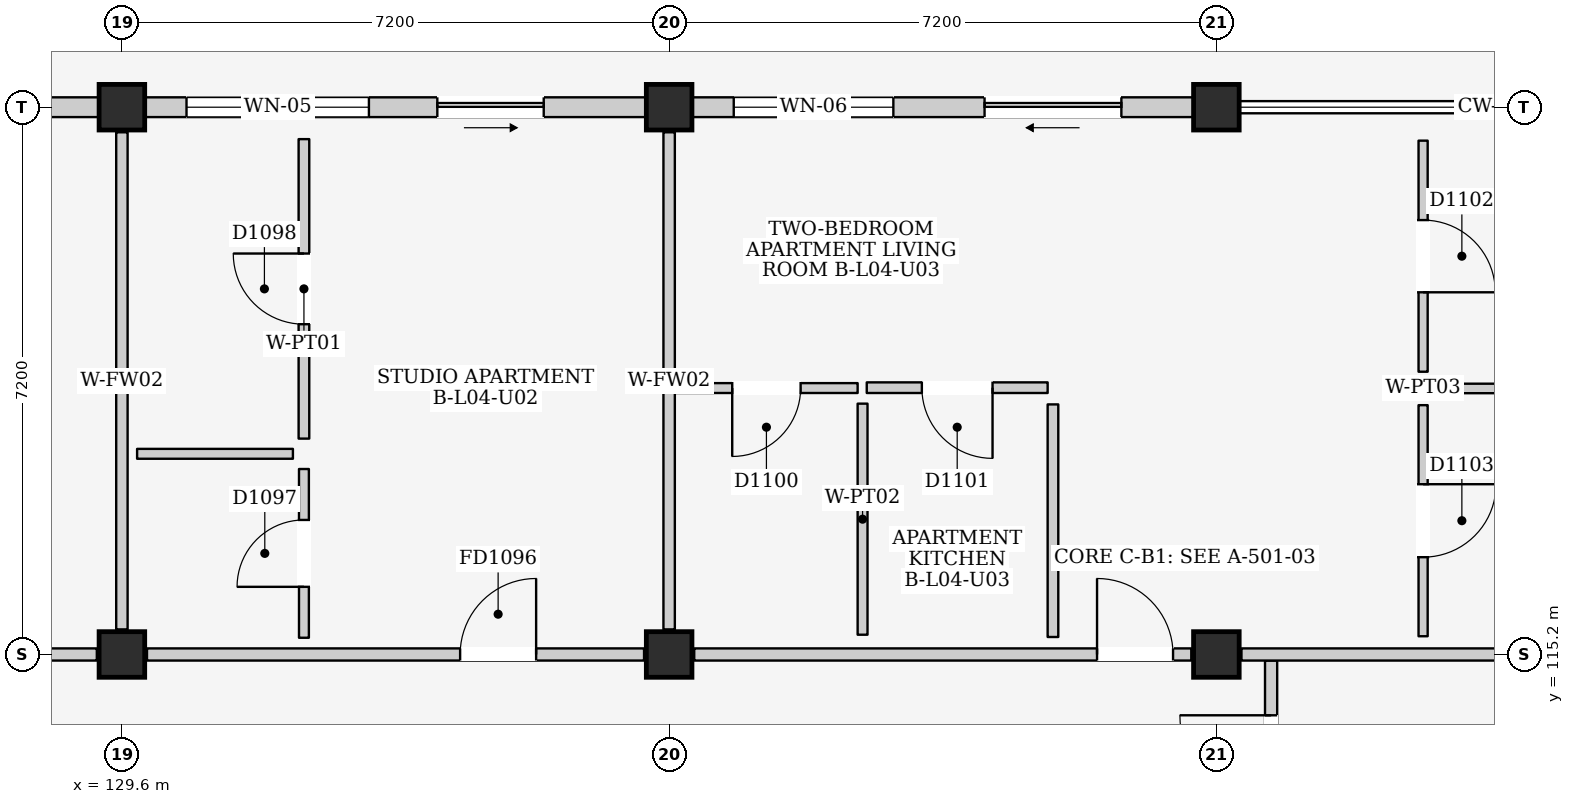
"""IFC4 building model, lengths in metres.
Left out: names, types, materials, properties, quantities, classifications, styles, units other than length and angle.
Written with IfcOpenShell. Run it as: python <this file> out.ifc"""

import sys

from ifc_helpers import new_model, si_unit, direction, frame, frame_2d, origin, origin_2d, place, context, subcontext, project, spatial, rectangle, extrude, element, fill, save


model = new_model("IFC4")
c1 = context("Model", 3, precision=1e-05, world=origin(), true_north=direction((0.0, 1.0)))
c2 = subcontext(c1, "Body", "Model", "MODEL_VIEW")
j1 = project(units=[si_unit("LENGTHUNIT", "METRE"), si_unit("PLANEANGLEUNIT", "RADIAN")], contexts=[c1])
p1 = place(None, origin())
s1 = spatial("IfcSite", under=j1, at=p1, CompositionType="ELEMENT")
p2 = place(p1, origin())
s2 = spatial("IfcBuilding", under=s1, at=p2, CompositionType="ELEMENT")
p3 = place(p2, frame((0.0, 0.0, 15.4)))
s3 = spatial("IfcBuildingStorey", under=s2, at=p3, CompositionType="ELEMENT", Elevation=15.4)
for number, where, z_axis, x_axis in (
    (1, (129.6, 115.2, 0.0), (0.0, 0.0, 1.0), (1.0, 0.0, 0.0)),
    (2, (129.6, 122.4, 0.0), (0.0, 0.0, 1.0), (1.0, 0.0, 0.0)),
    (3, (136.8, 115.2, 0.0), (0.0, 0.0, 1.0), (1.0, 0.0, 0.0)),
    (4, (136.8, 122.4, 0.0), (0.0, 0.0, 1.0), (1.0, 0.0, 0.0)),
    (5, (144.0, 115.2, 0.0), (0.0, 0.0, 1.0), (1.0, 0.0, 0.0)),
    (6, (144.0, 122.4, 0.0), (0.0, 0.0, 1.0), (1.0, 0.0, 0.0)),
):
    element("IfcColumn", number, at=place(p3, frame(where, z_axis=z_axis, x_axis=x_axis)), inside=s3, PredefinedType="COLUMN", context=c2, shape_type="SweptSolid", body=[
        extrude(rectangle(XDim=0.6, YDim=0.6, at=origin_2d()), origin(), (0.0, 0.0, 1.0), 3.2),
    ])
p4 = place(p3, frame((122.7, 122.4, 0.0), z_axis=(0.0, 0.0, 1.0), x_axis=(1.0, 0.0, 0.0)))
e7 = element("IfcWall", 7, at=p4, inside=s3, PredefinedType="ELEMENTEDWALL", context=c2, shape_type="SweptSolid", body=[
    extrude(rectangle(XDim=6.6, YDim=0.26, at=frame_2d((3.3, 0.0))), origin(), (0.0, 0.0, 1.0), 2.43),
])
p5 = place(p4, frame((3.85, 0.0, 0.0)))
e8 = element("IfcOpeningElement", 8, at=p5, cuts=e7, PredefinedType="OPENING", context=c2, shape_type="SweptSolid", body=[
    extrude(rectangle(XDim=2.0, YDim=2.12, at=frame_2d((1.0, 1.06))), frame((0.0, 0.145, 0.0), z_axis=(0.0, -1.0, 0.0), x_axis=(1.0, 0.0, 0.0)), (0.0, 0.0, 1.0), 0.29),
])
p6 = place(p4, frame((0.55, 0.0, 0.9)))
e9 = element("IfcOpeningElement", 9, at=p6, cuts=e7, PredefinedType="OPENING", context=c2, shape_type="SweptSolid", body=[
    extrude(rectangle(XDim=0.9, YDim=1.1, at=frame_2d((0.45, 0.55))), frame((0.0, 0.145, 0.0), z_axis=(0.0, -1.0, 0.0), x_axis=(1.0, 0.0, 0.0)), (0.0, 0.0, 1.0), 0.29),
])
p7 = place(p3, frame((129.9, 122.4, 0.0), z_axis=(0.0, 0.0, 1.0), x_axis=(1.0, 0.0, 0.0)))
e10 = element("IfcWall", 10, at=p7, inside=s3, PredefinedType="ELEMENTEDWALL", context=c2, shape_type="SweptSolid", body=[
    extrude(rectangle(XDim=6.6, YDim=0.26, at=frame_2d((3.3, 0.0))), origin(), (0.0, 0.0, 1.0), 2.43),
])
p8 = place(p7, frame((3.85, 0.0, 0.0)))
e11 = element("IfcOpeningElement", 11, at=p8, cuts=e10, PredefinedType="OPENING", context=c2, shape_type="SweptSolid", body=[
    extrude(rectangle(XDim=1.4, YDim=2.1, at=frame_2d((0.7, 1.05))), frame((0.0, 0.145, 0.0), z_axis=(0.0, -1.0, 0.0), x_axis=(1.0, 0.0, 0.0)), (0.0, 0.0, 1.0), 0.29),
])
p9 = place(p7, frame((0.55, 0.0, 0.66)))
e12 = element("IfcOpeningElement", 12, at=p9, cuts=e10, PredefinedType="OPENING", context=c2, shape_type="SweptSolid", body=[
    extrude(rectangle(XDim=2.4, YDim=1.65, at=frame_2d((1.2, 0.825))), frame((0.0, 0.145, 0.0), z_axis=(0.0, -1.0, 0.0), x_axis=(1.0, 0.0, 0.0)), (0.0, 0.0, 1.0), 0.29),
])
p10 = place(p3, frame((137.1, 122.4, 0.0), z_axis=(0.0, 0.0, 1.0), x_axis=(1.0, 0.0, 0.0)))
e13 = element("IfcWall", 13, at=p10, inside=s3, PredefinedType="ELEMENTEDWALL", context=c2, shape_type="SweptSolid", body=[
    extrude(rectangle(XDim=6.6, YDim=0.26, at=frame_2d((3.3, 0.0))), origin(), (0.0, 0.0, 1.0), 2.43),
])
p11 = place(p10, frame((3.85, 0.0, 0.0)))
e14 = element("IfcOpeningElement", 14, at=p11, cuts=e13, PredefinedType="OPENING", context=c2, shape_type="SweptSolid", body=[
    extrude(rectangle(XDim=1.8, YDim=2.12, at=frame_2d((0.9, 1.06))), frame((0.0, 0.145, 0.0), z_axis=(0.0, -1.0, 0.0), x_axis=(1.0, 0.0, 0.0)), (0.0, 0.0, 1.0), 0.29),
])
p12 = place(p10, frame((0.55, 0.0, 0.66)))
e15 = element("IfcOpeningElement", 15, at=p12, cuts=e13, PredefinedType="OPENING", context=c2, shape_type="SweptSolid", body=[
    extrude(rectangle(XDim=2.1, YDim=1.65, at=frame_2d((1.05, 0.825))), frame((0.0, 0.145, 0.0), z_axis=(0.0, -1.0, 0.0), x_axis=(1.0, 0.0, 0.0)), (0.0, 0.0, 1.0), 0.29),
])
p13 = place(p3, frame((144.72, 111.1, 0.0), z_axis=(0.0, 0.0, 1.0), x_axis=(0.0, 1.0, 0.0)))
e16 = element("IfcWall", 16, at=p13, inside=s3, PredefinedType="PARTITIONING", context=c2, shape_type="SweptSolid", body=[
    extrude(rectangle(XDim=4.02, YDim=0.16, at=frame_2d((2.01, 0.0))), origin(), (0.0, 0.0, 1.0), 2.95),
])
p14 = place(p13, frame((2.1, 0.0, 0.0)))
e17 = element("IfcOpeningElement", 17, at=p14, cuts=e16, PredefinedType="OPENING", context=c2, shape_type="SweptSolid", body=[
    extrude(rectangle(XDim=1.2, YDim=2.2, at=frame_2d((0.6, 1.1))), frame((0.0, 0.095, 0.0), z_axis=(0.0, -1.0, 0.0), x_axis=(1.0, 0.0, 0.0)), (0.0, 0.0, 1.0), 0.19),
])
p15 = place(p3, frame((122.73, 115.2, 0.0), z_axis=(0.0, 0.0, 1.0), x_axis=(1.0, 0.0, 0.0)))
e18 = element("IfcWall", 18, at=p15, inside=s3, PredefinedType="PARTITIONING", context=c2, shape_type="SweptSolid", body=[
    extrude(rectangle(XDim=6.54, YDim=0.16, at=frame_2d((3.27, 0.0))), origin(), (0.0, 0.0, 1.0), 2.335),
])
p16 = place(p15, frame((4.095, 0.0, 0.0)))
e19 = element("IfcOpeningElement", 19, at=p16, cuts=e18, PredefinedType="OPENING", context=c2, shape_type="SweptSolid", body=[
    extrude(rectangle(XDim=1.05, YDim=2.2, at=frame_2d((0.525, 1.1))), frame((0.0, 0.095, 0.0), z_axis=(0.0, -1.0, 0.0), x_axis=(1.0, 0.0, 0.0)), (0.0, 0.0, 1.0), 0.19),
])
p17 = place(p3, frame((129.6, 115.53, 0.0), z_axis=(0.0, 0.0, 1.0), x_axis=(0.0, 1.0, 0.0)))
e20 = element("IfcWall", 20, at=p17, inside=s3, PredefinedType="PARTITIONING", context=c2, shape_type="SweptSolid", body=[
    extrude(rectangle(XDim=6.54, YDim=0.15, at=frame_2d((3.27, 0.0))), origin(), (0.0, 0.0, 1.0), 2.385),
])
p18 = place(p3, frame((129.93, 115.2, 0.0), z_axis=(0.0, 0.0, 1.0), x_axis=(1.0, 0.0, 0.0)))
e21 = element("IfcWall", 21, at=p18, inside=s3, PredefinedType="PARTITIONING", context=c2, shape_type="SweptSolid", body=[
    extrude(rectangle(XDim=6.54, YDim=0.16, at=frame_2d((3.27, 0.0))), origin(), (0.0, 0.0, 1.0), 2.335),
])
p19 = place(p18, frame((4.12, 0.0, 0.0)))
e22 = element("IfcOpeningElement", 22, at=p19, cuts=e21, PredefinedType="OPENING", context=c2, shape_type="SweptSolid", body=[
    extrude(rectangle(XDim=1.0, YDim=2.15, at=frame_2d((0.5, 1.075))), frame((0.0, 0.095, 0.0), z_axis=(0.0, -1.0, 0.0), x_axis=(1.0, 0.0, 0.0)), (0.0, 0.0, 1.0), 0.19),
])
p20 = place(p3, frame((136.8, 115.53, 0.0), z_axis=(0.0, 0.0, 1.0), x_axis=(0.0, 1.0, 0.0)))
e23 = element("IfcWall", 23, at=p20, inside=s3, PredefinedType="PARTITIONING", context=c2, shape_type="SweptSolid", body=[
    extrude(rectangle(XDim=6.54, YDim=0.15, at=frame_2d((3.27, 0.0))), origin(), (0.0, 0.0, 1.0), 2.385),
])
p21 = place(p3, frame((129.8, 117.84, 0.0), z_axis=(0.0, 0.0, 1.0), x_axis=(1.0, 0.0, 0.0)))
e24 = element("IfcWall", 24, at=p21, inside=s3, PredefinedType="PARTITIONING", context=c2, shape_type="SweptSolid", body=[
    extrude(rectangle(XDim=2.05, YDim=0.13, at=frame_2d((1.025, 0.0))), origin(), (0.0, 0.0, 1.0), 2.95),
])
p22 = place(p3, frame((131.995, 115.42, 0.0), z_axis=(0.0, 0.0, 1.0), x_axis=(0.0, 1.0, 0.0)))
e25 = element("IfcWall", 25, at=p22, inside=s3, PredefinedType="PARTITIONING", context=c2, shape_type="SweptSolid", body=[
    extrude(rectangle(XDim=2.22, YDim=0.13, at=frame_2d((1.11, 0.0))), origin(), (0.0, 0.0, 1.0), 2.95),
])
p23 = place(p22, frame((0.67, 0.0, 0.0)))
e26 = element("IfcOpeningElement", 26, at=p23, cuts=e25, PredefinedType="OPENING", context=c2, shape_type="SweptSolid", body=[
    extrude(rectangle(XDim=0.88, YDim=2.1, at=frame_2d((0.44, 1.05))), frame((0.0, 0.08, 0.0), z_axis=(0.0, -1.0, 0.0), x_axis=(1.0, 0.0, 0.0)), (0.0, 0.0, 1.0), 0.16),
])
p24 = place(p3, frame((131.995, 118.04, 0.0), z_axis=(0.0, 0.0, 1.0), x_axis=(0.0, 1.0, 0.0)))
e27 = element("IfcWall", 27, at=p24, inside=s3, PredefinedType="PARTITIONING", context=c2, shape_type="SweptSolid", body=[
    extrude(rectangle(XDim=3.94, YDim=0.14, at=frame_2d((1.97, 0.0))), origin(), (0.0, 0.0, 1.0), 2.95),
])
p25 = place(p24, frame((1.505, 0.0, 0.0)))
e28 = element("IfcOpeningElement", 28, at=p25, cuts=e27, PredefinedType="OPENING", context=c2, shape_type="SweptSolid", body=[
    extrude(rectangle(XDim=0.93, YDim=2.14, at=frame_2d((0.465, 1.07))), frame((0.0, 0.085, 0.0), z_axis=(0.0, -1.0, 0.0), x_axis=(1.0, 0.0, 0.0)), (0.0, 0.0, 1.0), 0.17),
])
p26 = place(p3, frame((137.13, 115.2, 0.0), z_axis=(0.0, 0.0, 1.0), x_axis=(1.0, 0.0, 0.0)))
e29 = element("IfcWall", 29, at=p26, inside=s3, PredefinedType="PARTITIONING", context=c2, shape_type="SweptSolid", body=[
    extrude(rectangle(XDim=6.54, YDim=0.16, at=frame_2d((3.27, 0.0))), origin(), (0.0, 0.0, 1.0), 2.335),
])
p27 = place(p26, frame((5.3, 0.0, 0.0)))
e30 = element("IfcOpeningElement", 30, at=p27, cuts=e29, PredefinedType="OPENING", context=c2, shape_type="SweptSolid", body=[
    extrude(rectangle(XDim=1.0, YDim=2.15, at=frame_2d((0.5, 1.075))), frame((0.0, 0.095, 0.0), z_axis=(0.0, -1.0, 0.0), x_axis=(1.0, 0.0, 0.0)), (0.0, 0.0, 1.0), 0.19),
])
p28 = place(p3, frame((144.33, 115.2, 0.0), z_axis=(0.0, 0.0, 1.0), x_axis=(1.0, 0.0, 0.0)))
e31 = element("IfcWall", 31, at=p28, inside=s3, PredefinedType="PARTITIONING", context=c2, shape_type="SweptSolid", body=[
    extrude(rectangle(XDim=6.54, YDim=0.16, at=frame_2d((3.27, 0.0))), origin(), (0.0, 0.0, 1.0), 2.335),
])
p29 = place(p3, frame((136.88, 118.705, 0.0), z_axis=(0.0, 0.0, 1.0), x_axis=(1.0, 0.0, 0.0)))
e32 = element("IfcWall", 32, at=p29, inside=s3, PredefinedType="PARTITIONING", context=c2, shape_type="SweptSolid", body=[
    extrude(rectangle(XDim=2.4, YDim=0.13, at=frame_2d((1.2, 0.0))), origin(), (0.0, 0.0, 1.0), 2.95),
])
p30 = place(p29, frame((0.75, 0.0, 0.0)))
e33 = element("IfcOpeningElement", 33, at=p30, cuts=e32, PredefinedType="OPENING", context=c2, shape_type="SweptSolid", body=[
    extrude(rectangle(XDim=0.9, YDim=2.1, at=frame_2d((0.45, 1.05))), frame((0.0, 0.08, 0.0), z_axis=(0.0, -1.0, 0.0), x_axis=(1.0, 0.0, 0.0)), (0.0, 0.0, 1.0), 0.16),
])
p31 = place(p3, frame((139.345, 115.46, 0.0), z_axis=(0.0, 0.0, 1.0), x_axis=(0.0, 1.0, 0.0)))
e34 = element("IfcWall", 34, at=p31, inside=s3, PredefinedType="PARTITIONING", context=c2, shape_type="SweptSolid", body=[
    extrude(rectangle(XDim=3.04, YDim=0.13, at=frame_2d((1.52, 0.0))), origin(), (0.0, 0.0, 1.0), 2.95),
])
p32 = place(p3, frame((139.4, 118.71, 0.0), z_axis=(0.0, 0.0, 1.0), x_axis=(1.0, 0.0, 0.0)))
e35 = element("IfcWall", 35, at=p32, inside=s3, PredefinedType="PARTITIONING", context=c2, shape_type="SweptSolid", body=[
    extrude(rectangle(XDim=2.38, YDim=0.14, at=frame_2d((1.19, 0.0))), origin(), (0.0, 0.0, 1.0), 2.95),
])
p33 = place(p32, frame((0.725, 0.0, 0.0)))
e36 = element("IfcOpeningElement", 36, at=p33, cuts=e35, PredefinedType="OPENING", context=c2, shape_type="SweptSolid", body=[
    extrude(rectangle(XDim=0.93, YDim=2.14, at=frame_2d((0.465, 1.07))), frame((0.0, 0.085, 0.0), z_axis=(0.0, -1.0, 0.0), x_axis=(1.0, 0.0, 0.0)), (0.0, 0.0, 1.0), 0.17),
])
p34 = place(p3, frame((141.85, 115.43, 0.0), z_axis=(0.0, 0.0, 1.0), x_axis=(0.0, 1.0, 0.0)))
e37 = element("IfcWall", 37, at=p34, inside=s3, PredefinedType="PARTITIONING", context=c2, shape_type="SweptSolid", body=[
    extrude(rectangle(XDim=3.06, YDim=0.14, at=frame_2d((1.53, 0.0))), origin(), (0.0, 0.0, 1.0), 2.95),
])
p35 = place(p3, frame((146.72, 118.92, 0.0), z_axis=(0.0, 0.0, 1.0), x_axis=(0.0, 1.0, 0.0)))
e38 = element("IfcWall", 38, at=p35, inside=s3, PredefinedType="PARTITIONING", context=c2, shape_type="SweptSolid", body=[
    extrude(rectangle(XDim=3.04, YDim=0.12, at=frame_2d((1.52, 0.0))), origin(), (0.0, 0.0, 1.0), 2.95),
])
p36 = place(p35, frame((1.045, 0.0, 0.0)))
e39 = element("IfcOpeningElement", 39, at=p36, cuts=e38, PredefinedType="OPENING", context=c2, shape_type="SweptSolid", body=[
    extrude(rectangle(XDim=0.95, YDim=2.15, at=frame_2d((0.475, 1.075))), frame((0.0, 0.075, 0.0), z_axis=(0.0, -1.0, 0.0), x_axis=(1.0, 0.0, 0.0)), (0.0, 0.0, 1.0), 0.15),
])
p37 = place(p3, frame((146.92, 118.7, 0.0), z_axis=(0.0, 0.0, 1.0), x_axis=(1.0, 0.0, 0.0)))
e40 = element("IfcWall", 40, at=p37, inside=s3, PredefinedType="PARTITIONING", context=c2, shape_type="SweptSolid", body=[
    extrude(rectangle(XDim=4.06, YDim=0.125, at=frame_2d((2.03, 0.0))), origin(), (0.0, 0.0, 1.0), 2.95),
])
p38 = place(p3, frame((146.72, 115.44, 0.0), z_axis=(0.0, 0.0, 1.0), x_axis=(0.0, 1.0, 0.0)))
e41 = element("IfcWall", 41, at=p38, inside=s3, PredefinedType="PARTITIONING", context=c2, shape_type="SweptSolid", body=[
    extrude(rectangle(XDim=3.04, YDim=0.12, at=frame_2d((1.52, 0.0))), origin(), (0.0, 0.0, 1.0), 2.95),
])
p39 = place(p38, frame((1.04, 0.0, 0.0)))
e42 = element("IfcOpeningElement", 42, at=p39, cuts=e41, PredefinedType="OPENING", context=c2, shape_type="SweptSolid", body=[
    extrude(rectangle(XDim=0.96, YDim=2.15, at=frame_2d((0.48, 1.075))), frame((0.0, 0.075, 0.0), z_axis=(0.0, -1.0, 0.0), x_axis=(1.0, 0.0, 0.0)), (0.0, 0.0, 1.0), 0.15),
])
p40 = place(p8, frame((1.4, 0.0, 0.0), z_axis=(0.0, 0.0, 1.0), x_axis=(-1.0, 0.0, 0.0)))
e43 = element("IfcDoor", 43, at=p40, inside=s3, OperationType="SLIDING_TO_RIGHT", PredefinedType="DOOR", context=c2, shape_type="SweptSolid", body=[
    extrude(rectangle(XDim=1.4, YDim=2.1, at=frame_2d((0.7, 1.05))), frame((0.0, 0.025, 0.0), z_axis=(0.0, -1.0, 0.0), x_axis=(1.0, 0.0, 0.0)), (0.0, 0.0, 1.0), 0.05),
])
fill(e11, e43)
p41 = place(p9, origin())
e44 = element("IfcWindow", 44, at=p41, inside=s3, PartitioningType="TRIPLE_PANEL_VERTICAL", PredefinedType="WINDOW", context=c2, shape_type="SweptSolid", body=[
    extrude(rectangle(XDim=2.4, YDim=1.65, at=frame_2d((1.2, 0.825))), frame((0.0, 0.03, 0.0), z_axis=(0.0, -1.0, 0.0), x_axis=(1.0, 0.0, 0.0)), (0.0, 0.0, 1.0), 0.06),
])
fill(e12, e44)
p42 = place(p11, frame((1.8, 0.0, 0.0), z_axis=(0.0, 0.0, 1.0), x_axis=(-1.0, 0.0, 0.0)))
e45 = element("IfcDoor", 45, at=p42, inside=s3, OperationType="SLIDING_TO_LEFT", PredefinedType="DOOR", context=c2, shape_type="SweptSolid", body=[
    extrude(rectangle(XDim=1.8, YDim=2.12, at=frame_2d((0.9, 1.06))), frame((0.0, 0.025, 0.0), z_axis=(0.0, -1.0, 0.0), x_axis=(1.0, 0.0, 0.0)), (0.0, 0.0, 1.0), 0.05),
])
fill(e14, e45)
p43 = place(p12, origin())
e46 = element("IfcWindow", 46, at=p43, inside=s3, PartitioningType="DOUBLE_PANEL_VERTICAL", PredefinedType="WINDOW", context=c2, shape_type="SweptSolid", body=[
    extrude(rectangle(XDim=2.1, YDim=1.65, at=frame_2d((1.05, 0.825))), frame((0.0, 0.03, 0.0), z_axis=(0.0, -1.0, 0.0), x_axis=(1.0, 0.0, 0.0)), (0.0, 0.0, 1.0), 0.06),
])
fill(e15, e46)
p44 = place(p14, origin())
e47 = element("IfcDoor", 47, at=p44, inside=s3, OperationType="SINGLE_SWING_RIGHT", PredefinedType="DOOR", context=c2, shape_type="SweptSolid", body=[
    extrude(rectangle(XDim=1.2, YDim=2.2, at=frame_2d((0.6, 1.1))), frame((0.0, 0.025, 0.0), z_axis=(0.0, -1.0, 0.0), x_axis=(1.0, 0.0, 0.0)), (0.0, 0.0, 1.0), 0.05),
])
fill(e17, e47)
p45 = place(p19, origin())
e48 = element("IfcDoor", 48, at=p45, inside=s3, OperationType="SINGLE_SWING_RIGHT", PredefinedType="DOOR", context=c2, shape_type="SweptSolid", body=[
    extrude(rectangle(XDim=1.0, YDim=2.15, at=frame_2d((0.5, 1.075))), frame((0.0, 0.025, 0.0), z_axis=(0.0, -1.0, 0.0), x_axis=(1.0, 0.0, 0.0)), (0.0, 0.0, 1.0), 0.05),
])
fill(e22, e48)
p46 = place(p23, origin())
e49 = element("IfcDoor", 49, at=p46, inside=s3, OperationType="SINGLE_SWING_LEFT", PredefinedType="DOOR", context=c2, shape_type="SweptSolid", body=[
    extrude(rectangle(XDim=0.88, YDim=2.1, at=frame_2d((0.44, 1.05))), frame((0.0, 0.025, 0.0), z_axis=(0.0, -1.0, 0.0), x_axis=(1.0, 0.0, 0.0)), (0.0, 0.0, 1.0), 0.05),
])
fill(e26, e49)
p47 = place(p25, origin())
e50 = element("IfcDoor", 50, at=p47, inside=s3, OperationType="SINGLE_SWING_RIGHT", PredefinedType="DOOR", context=c2, shape_type="SweptSolid", body=[
    extrude(rectangle(XDim=0.93, YDim=2.14, at=frame_2d((0.465, 1.07))), frame((0.0, 0.025, 0.0), z_axis=(0.0, -1.0, 0.0), x_axis=(1.0, 0.0, 0.0)), (0.0, 0.0, 1.0), 0.05),
])
fill(e28, e50)
p48 = place(p27, origin())
e51 = element("IfcDoor", 51, at=p48, inside=s3, OperationType="SINGLE_SWING_LEFT", PredefinedType="DOOR", context=c2, shape_type="SweptSolid", body=[
    extrude(rectangle(XDim=1.0, YDim=2.15, at=frame_2d((0.5, 1.075))), frame((0.0, 0.025, 0.0), z_axis=(0.0, -1.0, 0.0), x_axis=(1.0, 0.0, 0.0)), (0.0, 0.0, 1.0), 0.05),
])
fill(e30, e51)
p49 = place(p30, frame((0.9, 0.0, 0.0), z_axis=(0.0, 0.0, 1.0), x_axis=(-1.0, 0.0, 0.0)))
e52 = element("IfcDoor", 52, at=p49, inside=s3, OperationType="SINGLE_SWING_RIGHT", PredefinedType="DOOR", context=c2, shape_type="SweptSolid", body=[
    extrude(rectangle(XDim=0.9, YDim=2.1, at=frame_2d((0.45, 1.05))), frame((0.0, 0.025, 0.0), z_axis=(0.0, -1.0, 0.0), x_axis=(1.0, 0.0, 0.0)), (0.0, 0.0, 1.0), 0.05),
])
fill(e33, e52)
p50 = place(p33, frame((0.93, 0.0, 0.0), z_axis=(0.0, 0.0, 1.0), x_axis=(-1.0, 0.0, 0.0)))
e53 = element("IfcDoor", 53, at=p50, inside=s3, OperationType="SINGLE_SWING_LEFT", PredefinedType="DOOR", context=c2, shape_type="SweptSolid", body=[
    extrude(rectangle(XDim=0.93, YDim=2.14, at=frame_2d((0.465, 1.07))), frame((0.0, 0.025, 0.0), z_axis=(0.0, -1.0, 0.0), x_axis=(1.0, 0.0, 0.0)), (0.0, 0.0, 1.0), 0.05),
])
fill(e36, e53)
p51 = place(p36, frame((0.95, 0.0, 0.0), z_axis=(0.0, 0.0, 1.0), x_axis=(-1.0, 0.0, 0.0)))
e54 = element("IfcDoor", 54, at=p51, inside=s3, OperationType="SINGLE_SWING_RIGHT", PredefinedType="DOOR", context=c2, shape_type="SweptSolid", body=[
    extrude(rectangle(XDim=0.95, YDim=2.15, at=frame_2d((0.475, 1.075))), frame((0.0, 0.025, 0.0), z_axis=(0.0, -1.0, 0.0), x_axis=(1.0, 0.0, 0.0)), (0.0, 0.0, 1.0), 0.05),
])
fill(e39, e54)
p52 = place(p39, frame((0.96, 0.0, 0.0), z_axis=(0.0, 0.0, 1.0), x_axis=(-1.0, 0.0, 0.0)))
e55 = element("IfcDoor", 55, at=p52, inside=s3, OperationType="SINGLE_SWING_LEFT", PredefinedType="DOOR", context=c2, shape_type="SweptSolid", body=[
    extrude(rectangle(XDim=0.96, YDim=2.15, at=frame_2d((0.48, 1.075))), frame((0.0, 0.025, 0.0), z_axis=(0.0, -1.0, 0.0), x_axis=(1.0, 0.0, 0.0)), (0.0, 0.0, 1.0), 0.05),
])
fill(e42, e55)
save(model, sys.argv[1])
